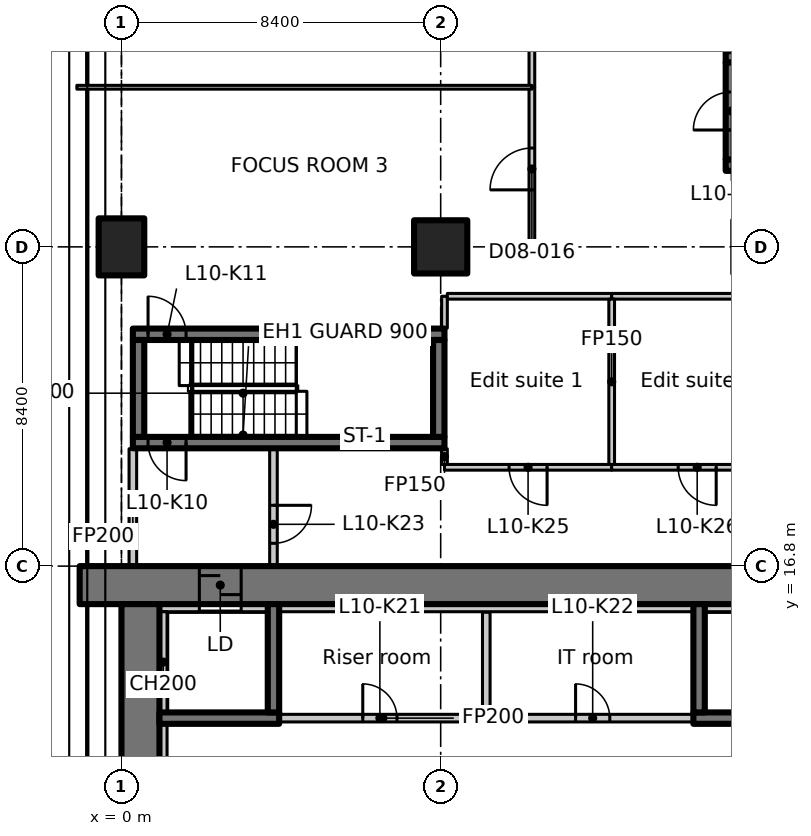
"""IFC4 building model, lengths in metres.
Left out: names, types, materials, properties, quantities, classifications, styles, units other than length and angle.
Written with IfcOpenShell. Run it as: python <this file> out.ifc"""

import sys

from ifc_helpers import new_model, si_unit, direction, frame, frame_2d, origin, origin_2d, place, context, subcontext, project, spatial, polyline, rectangle, outline, extrude, element, fill, save


model = new_model("IFC4")
c1 = context("Model", 3, precision=1e-05, world=origin(), true_north=direction((0.0, 1.0)))
c2 = subcontext(c1, "Body", "Model", "MODEL_VIEW")
j1 = project(units=[si_unit("LENGTHUNIT", "METRE"), si_unit("PLANEANGLEUNIT", "RADIAN")], contexts=[c1])
p1 = place(None, origin())
s1 = spatial("IfcSite", under=j1, at=p1, CompositionType="ELEMENT")
p2 = place(p1, origin())
s2 = spatial("IfcBuilding", under=s1, at=p2, CompositionType="ELEMENT")
p3 = place(p2, frame((0.0, 0.0, 50.9)))
s3 = spatial("IfcBuildingStorey", under=s2, at=p3, CompositionType="ELEMENT", Elevation=50.9)
p4 = place(p3, frame((0.0, 25.2, 0.0), z_axis=(0.0, 0.0, 1.0), x_axis=(1.0, 0.0, 0.0)))
e1 = element("IfcColumn", 1, at=p4, inside=s3, PredefinedType="COLUMN", context=c2, shape_type="SweptSolid", body=[
    extrude(rectangle(XDim=1.2, YDim=1.5, at=origin_2d()), origin(), (0.0, 0.0, 1.0), 3.35),
])
p5 = place(p3, frame((8.4, 25.2, 0.0), z_axis=(0.0, 0.0, 1.0), x_axis=(1.0, 0.0, 0.0)))
e2 = element("IfcColumn", 2, at=p5, inside=s3, PredefinedType="COLUMN", context=c2, shape_type="SweptSolid", body=[
    extrude(rectangle(XDim=1.4, YDim=1.4, at=origin_2d()), origin(), (0.0, 0.0, 1.0), 3.35),
])
p6 = place(p3, frame((-1.1, 16.3, 0.0), z_axis=(0.0, 0.0, 1.0), x_axis=(1.0, 0.0, 0.0)))
e3 = element("IfcWall", 3, at=p6, inside=s3, PredefinedType="SHEAR", context=c2, shape_type="SweptSolid", body=[
    extrude(rectangle(XDim=22.1, YDim=1.0, at=frame_2d((11.05, 0.0))), origin(), (0.0, 0.0, 1.0), 3.35),
])
p7 = place(p6, frame((3.15, 0.0, 0.0)))
e4 = element("IfcOpeningElement", 4, at=p7, cuts=e3, PredefinedType="OPENING", context=c2, shape_type="SweptSolid", body=[
    extrude(rectangle(XDim=1.1, YDim=2.3, at=frame_2d((0.55, 1.15))), frame((0.0, 0.51, 0.0), z_axis=(0.0, -1.0, 0.0), x_axis=(1.0, 0.0, 0.0)), (0.0, 0.0, 1.0), 1.02),
])
p8 = place(p3, frame((0.5, 6.936, 0.0), z_axis=(0.0, 0.0, 1.0), x_axis=(0.0, 1.0, 0.0)))
e5 = element("IfcWall", 5, at=p8, inside=s3, PredefinedType="SHEAR", context=c2, shape_type="SweptSolid", body=[
    extrude(rectangle(XDim=8.864, YDim=1.0, at=frame_2d((4.432, 0.0))), origin(), (0.0, 0.0, 1.0), 3.35),
])
p9 = place(p3, frame((1.0, 15.7, 0.0), z_axis=(0.0, 0.0, 1.0), x_axis=(1.0, 0.0, 0.0)))
e6 = element("IfcWall", 6, at=p9, inside=s3, PredefinedType="PARTITIONING", context=c2, shape_type="SweptSolid", body=[
    extrude(rectangle(XDim=1.05, YDim=0.2, at=frame_2d((0.525, 0.0))), origin(), (0.0, 0.0, 1.0), 3.35),
])
p10 = place(p3, frame((1.0, 12.8, 0.0), z_axis=(0.0, 0.0, 1.0), x_axis=(1.0, 0.0, 0.0)))
e7 = element("IfcWall", 7, at=p10, inside=s3, PredefinedType="SHEAR", context=c2, shape_type="SweptSolid", body=[
    extrude(rectangle(XDim=3.15, YDim=0.3, at=frame_2d((1.575, 0.0))), origin(), (0.0, 0.0, 1.0), 3.35),
])
p11 = place(p3, frame((4.0, 12.95, 0.0), z_axis=(0.0, 0.0, 1.0), x_axis=(0.0, 1.0, 0.0)))
e8 = element("IfcWall", 8, at=p11, inside=s3, PredefinedType="SHEAR", context=c2, shape_type="SweptSolid", body=[
    extrude(rectangle(XDim=2.85, YDim=0.3, at=frame_2d((1.425, 0.0))), origin(), (0.0, 0.0, 1.0), 3.35),
])
p12 = place(p3, frame((15.05, 12.8, 0.0), z_axis=(0.0, 0.0, 1.0), x_axis=(1.0, 0.0, 0.0)))
e9 = element("IfcWall", 9, at=p12, inside=s3, PredefinedType="SHEAR", context=c2, shape_type="SweptSolid", body=[
    extrude(rectangle(XDim=5.9, YDim=0.3, at=frame_2d((2.95, 0.0))), origin(), (0.0, 0.0, 1.0), 3.35),
])
p13 = place(p12, frame((3.8, 0.0, 0.0)))
e10 = element("IfcOpeningElement", 10, at=p13, cuts=e9, PredefinedType="OPENING", context=c2, shape_type="SweptSolid", body=[
    extrude(rectangle(XDim=1.1, YDim=2.3, at=frame_2d((0.55, 1.15))), frame((0.0, 0.16, 0.0), z_axis=(0.0, -1.0, 0.0), x_axis=(1.0, 0.0, 0.0)), (0.0, 0.0, 1.0), 0.32),
])
p14 = place(p3, frame((15.2, 12.95, 0.0), z_axis=(0.0, 0.0, 1.0), x_axis=(0.0, 1.0, 0.0)))
e11 = element("IfcWall", 11, at=p14, inside=s3, PredefinedType="SHEAR", context=c2, shape_type="SweptSolid", body=[
    extrude(rectangle(XDim=2.85, YDim=0.3, at=frame_2d((1.425, 0.0))), origin(), (0.0, 0.0, 1.0), 3.35),
])
p15 = place(p3, frame((8.5, 20.05, 0.0), z_axis=(0.0, 0.0, 1.0), x_axis=(-1.0, 0.0, 0.0)))
e12 = element("IfcWall", 12, at=p15, inside=s3, PredefinedType="SHEAR", context=c2, shape_type="SweptSolid", body=[
    extrude(rectangle(XDim=8.2, YDim=0.3, at=frame_2d((4.1, 0.0))), origin(), (0.0, 0.0, 1.0), 3.35),
])
p16 = place(p15, frame((6.8, 0.0, 0.0)))
e13 = element("IfcOpeningElement", 13, at=p16, cuts=e12, PredefinedType="OPENING", context=c2, shape_type="SweptSolid", body=[
    extrude(rectangle(XDim=1.0, YDim=2.1, at=frame_2d((0.5, 1.05))), frame((0.0, 0.16, 0.0), z_axis=(0.0, -1.0, 0.0), x_axis=(1.0, 0.0, 0.0)), (0.0, 0.0, 1.0), 0.32),
])
p17 = place(p3, frame((0.3, 22.9, 0.0), z_axis=(0.0, 0.0, 1.0), x_axis=(1.0, 0.0, 0.0)))
e14 = element("IfcWall", 14, at=p17, inside=s3, PredefinedType="SHEAR", context=c2, shape_type="SweptSolid", body=[
    extrude(rectangle(XDim=8.2, YDim=0.3, at=frame_2d((4.1, 0.0))), origin(), (0.0, 0.0, 1.0), 3.35),
])
p18 = place(p17, frame((0.4, 0.0, 0.0)))
e15 = element("IfcOpeningElement", 15, at=p18, cuts=e14, PredefinedType="OPENING", context=c2, shape_type="SweptSolid", body=[
    extrude(rectangle(XDim=1.0, YDim=2.1, at=frame_2d((0.5, 1.05))), frame((0.0, 0.16, 0.0), z_axis=(0.0, -1.0, 0.0), x_axis=(1.0, 0.0, 0.0)), (0.0, 0.0, 1.0), 0.32),
])
for number, where, z_axis, x_axis in (
    (16, (0.45, 20.2, 0.0), (0.0, 0.0, 1.0), (0.0, 1.0, 0.0)),
    (17, (8.35, 20.2, 0.0), (0.0, 0.0, 1.0), (0.0, 1.0, 0.0)),
):
    element("IfcWall", number, at=place(p3, frame(where, z_axis=z_axis, x_axis=x_axis)), inside=s3, PredefinedType="SHEAR", context=c2, shape_type="SweptSolid", body=[
        extrude(rectangle(XDim=2.55, YDim=0.3, at=frame_2d((1.275, 0.0))), origin(), (0.0, 0.0, 1.0), 3.35),
    ])
for number, where, z_axis, x_axis in (
    (18, (15.9, 27.35, 0.0), (0.0, 0.0, 1.0), (1.0, 0.0, 0.0)),
    (19, (15.9, 30.2, 0.0), (0.0, 0.0, 1.0), (1.0, 0.0, 0.0)),
):
    element("IfcWall", number, at=place(p3, frame(where, z_axis=z_axis, x_axis=x_axis)), inside=s3, PredefinedType="SHEAR", context=c2, shape_type="SweptSolid", body=[
        extrude(rectangle(XDim=8.2, YDim=0.3, at=frame_2d((4.1, 0.0))), origin(), (0.0, 0.0, 1.0), 3.35),
    ])
p19 = place(p3, frame((16.05, 27.5, 0.0), z_axis=(0.0, 0.0, 1.0), x_axis=(0.0, 1.0, 0.0)))
e20 = element("IfcWall", 20, at=p19, inside=s3, PredefinedType="SHEAR", context=c2, shape_type="SweptSolid", body=[
    extrude(rectangle(XDim=2.55, YDim=0.3, at=frame_2d((1.275, 0.0))), origin(), (0.0, 0.0, 1.0), 3.35),
])
p20 = place(p19, frame((0.775, 0.0, 0.0)))
e21 = element("IfcOpeningElement", 21, at=p20, cuts=e20, PredefinedType="OPENING", context=c2, shape_type="SweptSolid", body=[
    extrude(rectangle(XDim=1.0, YDim=2.1, at=frame_2d((0.5, 1.05))), frame((0.0, 0.16, 0.0), z_axis=(0.0, -1.0, 0.0), x_axis=(1.0, 0.0, 0.0)), (0.0, 0.0, 1.0), 0.32),
])
p21 = place(p3, frame((0.3, 16.812, 0.0), z_axis=(0.0, 0.0, 1.0), x_axis=(0.0, 1.0, 0.0)))
e22 = element("IfcWall", 22, at=p21, inside=s3, PredefinedType="PARTITIONING", context=c2, shape_type="SweptSolid", body=[
    extrude(rectangle(XDim=3.076, YDim=0.2, at=frame_2d((1.538, 0.0))), origin(), (0.0, 0.0, 1.0), 2.98),
])
p22 = place(p3, frame((4.0, 19.888, 0.0), z_axis=(0.0, 0.0, 1.0), x_axis=(0.0, -1.0, 0.0)))
e23 = element("IfcWall", 23, at=p22, inside=s3, PredefinedType="PARTITIONING", context=c2, shape_type="SweptSolid", body=[
    extrude(rectangle(XDim=3.076, YDim=0.2, at=frame_2d((1.538, 0.0))), origin(), (0.0, 0.0, 1.0), 3.35),
])
p23 = place(p22, frame((1.488, 0.0, 0.0)))
e24 = element("IfcOpeningElement", 24, at=p23, cuts=e23, PredefinedType="OPENING", context=c2, shape_type="SweptSolid", body=[
    extrude(rectangle(XDim=1.0, YDim=2.1, at=frame_2d((0.5, 1.05))), frame((0.0, 0.11, 0.0), z_axis=(0.0, -1.0, 0.0), x_axis=(1.0, 0.0, 0.0)), (0.0, 0.0, 1.0), 0.22),
])
p24 = place(p3, frame((4.162, 12.8, 0.0), z_axis=(0.0, 0.0, 1.0), x_axis=(1.0, 0.0, 0.0)))
e25 = element("IfcWall", 25, at=p24, inside=s3, PredefinedType="PARTITIONING", context=c2, shape_type="SweptSolid", body=[
    extrude(rectangle(XDim=5.438, YDim=0.2, at=frame_2d((2.719, 0.0))), origin(), (0.0, 0.0, 1.0), 3.35),
])
p25 = place(p24, frame((2.188, 0.0, 0.0)))
e26 = element("IfcOpeningElement", 26, at=p25, cuts=e25, PredefinedType="OPENING", context=c2, shape_type="SweptSolid", body=[
    extrude(rectangle(XDim=0.9, YDim=2.1, at=frame_2d((0.45, 1.05))), frame((0.0, 0.11, 0.0), z_axis=(0.0, -1.0, 0.0), x_axis=(1.0, 0.0, 0.0)), (0.0, 0.0, 1.0), 0.22),
])
p26 = place(p3, frame((9.6, 12.8, 0.0), z_axis=(0.0, 0.0, 1.0), x_axis=(1.0, 0.0, 0.0)))
e27 = element("IfcWall", 27, at=p26, inside=s3, PredefinedType="PARTITIONING", context=c2, shape_type="SweptSolid", body=[
    extrude(rectangle(XDim=5.438, YDim=0.2, at=frame_2d((2.719, 0.0))), origin(), (0.0, 0.0, 1.0), 3.35),
])
p27 = place(p26, frame((2.35, 0.0, 0.0)))
e28 = element("IfcOpeningElement", 28, at=p27, cuts=e27, PredefinedType="OPENING", context=c2, shape_type="SweptSolid", body=[
    extrude(rectangle(XDim=0.9, YDim=2.1, at=frame_2d((0.45, 1.05))), frame((0.0, 0.11, 0.0), z_axis=(0.0, -1.0, 0.0), x_axis=(1.0, 0.0, 0.0)), (0.0, 0.0, 1.0), 0.22),
])
p28 = place(p3, frame((9.6, 15.588, 0.0), z_axis=(0.0, 0.0, 1.0), x_axis=(0.0, -1.0, 0.0)))
e29 = element("IfcWall", 29, at=p28, inside=s3, PredefinedType="PARTITIONING", context=c2, shape_type="SweptSolid", body=[
    extrude(rectangle(XDim=2.688, YDim=0.2, at=frame_2d((1.344, 0.0))), origin(), (0.0, 0.0, 1.0), 3.35),
])
p29 = place(p3, frame((12.9, 19.4, 0.0), z_axis=(0.0, 0.0, 1.0), x_axis=(-1.0, 0.0, 0.0)))
e30 = element("IfcWall", 30, at=p29, inside=s3, PredefinedType="PARTITIONING", context=c2, shape_type="SweptSolid", body=[
    extrude(rectangle(XDim=4.4, YDim=0.15, at=frame_2d((2.2, 0.0))), origin(), (0.0, 0.0, 1.0), 3.35),
])
p30 = place(p29, frame((1.7, 0.0, 0.0)))
e31 = element("IfcOpeningElement", 31, at=p30, cuts=e30, PredefinedType="OPENING", context=c2, shape_type="SweptSolid", body=[
    extrude(rectangle(XDim=1.0, YDim=2.1, at=frame_2d((0.5, 1.05))), frame((0.0, 0.085, 0.0), z_axis=(0.0, -1.0, 0.0), x_axis=(1.0, 0.0, 0.0)), (0.0, 0.0, 1.0), 0.17),
])
p31 = place(p3, frame((8.5, 19.475, 0.0), z_axis=(0.0, 0.0, 1.0), x_axis=(0.0, 1.0, 0.0)))
e32 = element("IfcWall", 32, at=p31, inside=s3, PredefinedType="PARTITIONING", context=c2, shape_type="SweptSolid", body=[
    extrude(rectangle(XDim=0.413, YDim=0.15, at=frame_2d((0.207, 0.0))), origin(), (0.0, 0.0, 1.0), 3.35),
])
p32 = place(p3, frame((8.5, 23.062, 0.0), z_axis=(0.0, 0.0, 1.0), x_axis=(0.0, 1.0, 0.0)))
e33 = element("IfcWall", 33, at=p32, inside=s3, PredefinedType="PARTITIONING", context=c2, shape_type="SweptSolid", body=[
    extrude(rectangle(XDim=0.838, YDim=0.15, at=frame_2d((0.419, 0.0))), origin(), (0.0, 0.0, 1.0), 3.35),
])
p33 = place(p3, frame((8.575, 23.9, 0.0), z_axis=(0.0, 0.0, 1.0), x_axis=(1.0, 0.0, 0.0)))
e34 = element("IfcWall", 34, at=p33, inside=s3, PredefinedType="PARTITIONING", context=c2, shape_type="SweptSolid", body=[
    extrude(rectangle(XDim=4.325, YDim=0.15, at=frame_2d((2.163, 0.0))), origin(), (0.0, 0.0, 1.0), 3.35),
])
p34 = place(p3, frame((12.9, 23.9, 0.0), z_axis=(0.0, 0.0, 1.0), x_axis=(1.0, 0.0, 0.0)))
e35 = element("IfcWall", 35, at=p34, inside=s3, PredefinedType="PARTITIONING", context=c2, shape_type="SweptSolid", body=[
    extrude(rectangle(XDim=4.5, YDim=0.15, at=frame_2d((2.25, 0.0))), origin(), (0.0, 0.0, 1.0), 3.35),
])
p35 = place(p3, frame((17.325, 19.4, 0.0), z_axis=(0.0, 0.0, 1.0), x_axis=(-1.0, 0.0, 0.0)))
e36 = element("IfcWall", 36, at=p35, inside=s3, PredefinedType="PARTITIONING", context=c2, shape_type="SweptSolid", body=[
    extrude(rectangle(XDim=4.425, YDim=0.15, at=frame_2d((2.212, 0.0))), origin(), (0.0, 0.0, 1.0), 3.35),
])
p36 = place(p35, frame((1.675, 0.0, 0.0)))
e37 = element("IfcOpeningElement", 37, at=p36, cuts=e36, PredefinedType="OPENING", context=c2, shape_type="SweptSolid", body=[
    extrude(rectangle(XDim=1.0, YDim=2.1, at=frame_2d((0.5, 1.05))), frame((0.0, 0.085, 0.0), z_axis=(0.0, -1.0, 0.0), x_axis=(1.0, 0.0, 0.0)), (0.0, 0.0, 1.0), 0.17),
])
p37 = place(p3, frame((12.9, 23.825, 0.0), z_axis=(0.0, 0.0, 1.0), x_axis=(0.0, -1.0, 0.0)))
e38 = element("IfcWall", 38, at=p37, inside=s3, PredefinedType="PARTITIONING", context=c2, shape_type="SweptSolid", body=[
    extrude(rectangle(XDim=4.35, YDim=0.15, at=frame_2d((2.175, 0.0))), origin(), (0.0, 0.0, 1.0), 3.35),
])
p38 = place(p3, frame((1.1, 9.75, 0.0), z_axis=(0.0, 0.0, 1.0), x_axis=(0.0, 1.0, 0.0)))
e39 = element("IfcWall", 39, at=p38, inside=s3, PredefinedType="PARTITIONING", context=c2, shape_type="SweptSolid", body=[
    extrude(rectangle(XDim=2.9, YDim=0.2, at=frame_2d((1.45, 0.0))), origin(), (0.0, 0.0, 1.0), 3.35),
])
p39 = place(p3, frame((1.1, 12.95, 0.0), z_axis=(0.0, 0.0, 1.0), x_axis=(0.0, 1.0, 0.0)))
e40 = element("IfcWall", 40, at=p39, inside=s3, PredefinedType="PARTITIONING", context=c2, shape_type="SweptSolid", body=[
    extrude(rectangle(XDim=2.65, YDim=0.2, at=frame_2d((1.325, 0.0))), origin(), (0.0, 0.0, 1.0), 3.35),
])
p40 = place(p3, frame((3.15, 15.7, 0.0), z_axis=(0.0, 0.0, 1.0), x_axis=(1.0, 0.0, 0.0)))
e41 = element("IfcWall", 41, at=p40, inside=s3, PredefinedType="PARTITIONING", context=c2, shape_type="SweptSolid", body=[
    extrude(rectangle(XDim=0.7, YDim=0.2, at=frame_2d((0.35, 0.0))), origin(), (0.0, 0.0, 1.0), 3.35),
])
p41 = place(p3, frame((4.15, 15.7, 0.0), z_axis=(0.0, 0.0, 1.0), x_axis=(1.0, 0.0, 0.0)))
e42 = element("IfcWall", 42, at=p41, inside=s3, PredefinedType="PARTITIONING", context=c2, shape_type="SweptSolid", body=[
    extrude(rectangle(XDim=10.9, YDim=0.2, at=frame_2d((5.45, 0.0))), origin(), (0.0, 0.0, 1.0), 3.35),
])
p42 = place(p3, frame((15.35, 15.7, 0.0), z_axis=(0.0, 0.0, 1.0), x_axis=(1.0, 0.0, 0.0)))
e43 = element("IfcWall", 43, at=p42, inside=s3, PredefinedType="PARTITIONING", context=c2, shape_type="SweptSolid", body=[
    extrude(rectangle(XDim=2.5, YDim=0.2, at=frame_2d((1.25, 0.0))), origin(), (0.0, 0.0, 1.0), 3.35),
])
p43 = place(p3, frame((10.8, 25.2, 0.0), z_axis=(0.0, 0.0, 1.0), x_axis=(0.0, 1.0, 0.0)))
e44 = element("IfcWall", 44, at=p43, inside=s3, PredefinedType="PARTITIONING", context=c2, shape_type="SweptSolid", body=[
    extrude(rectangle(XDim=4.2, YDim=0.15, at=frame_2d((2.1, 0.0))), origin(), (0.0, 0.0, 1.0), 3.33),
])
p44 = place(p43, frame((1.5, 0.0, 0.0)))
e45 = element("IfcOpeningElement", 45, at=p44, cuts=e44, PredefinedType="OPENING", context=c2, shape_type="SweptSolid", body=[
    extrude(rectangle(XDim=1.1, YDim=2.1, at=frame_2d((0.55, 1.05))), frame((0.0, 0.085, 0.0), z_axis=(0.0, -1.0, 0.0), x_axis=(1.0, 0.0, 0.0)), (0.0, 0.0, 1.0), 0.17),
])
p45 = place(p3, frame((10.8, 29.4, 0.0), z_axis=(0.0, 0.0, 1.0), x_axis=(0.0, 1.0, 0.0)))
e46 = element("IfcWall", 46, at=p45, inside=s3, PredefinedType="PARTITIONING", context=c2, shape_type="SweptSolid", body=[
    extrude(rectangle(XDim=4.2, YDim=0.15, at=frame_2d((2.1, 0.0))), origin(), (0.0, 0.0, 1.0), 3.33),
])
p46 = place(p45, frame((1.5, 0.0, 0.0)))
e47 = element("IfcOpeningElement", 47, at=p46, cuts=e46, PredefinedType="OPENING", context=c2, shape_type="SweptSolid", body=[
    extrude(rectangle(XDim=1.1, YDim=2.1, at=frame_2d((0.55, 1.05))), frame((0.0, 0.085, 0.0), z_axis=(0.0, -1.0, 0.0), x_axis=(1.0, 0.0, 0.0)), (0.0, 0.0, 1.0), 0.17),
])
p47 = place(p3, frame((-1.174, 29.4, 0.0), z_axis=(0.0, 0.0, 1.0), x_axis=(1.0, 0.0, 0.0)))
e48 = element("IfcWall", 48, at=p47, inside=s3, PredefinedType="PARTITIONING", context=c2, shape_type="SweptSolid", body=[
    extrude(outline(polyline([(0.0, 0.0), (11.974, 0.0), (11.974, 3.33), (1.624, 3.33), (1.622, 2.98), (0.726, 2.98), (0.724, 3.33), (0.074, 3.33), (0.0, 3.33), (0.0, 0.0)])), frame((0.0, 0.05, 0.0), z_axis=(0.0, -1.0, 0.0), x_axis=(1.0, 0.0, 0.0)), (0.0, 0.0, 1.0), 0.1),
])
p48 = place(p7, origin())
e49 = element("IfcDoor", 49, at=p48, inside=s3, OperationType="SLIDING_TO_LEFT", PredefinedType="DOOR", context=c2, shape_type="SweptSolid", body=[
    extrude(rectangle(XDim=1.1, YDim=2.3, at=frame_2d((0.55, 1.15))), frame((0.0, 0.025, 0.0), z_axis=(0.0, -1.0, 0.0), x_axis=(1.0, 0.0, 0.0)), (0.0, 0.0, 1.0), 0.05),
])
fill(e4, e49)
p49 = place(p16, origin())
e50 = element("IfcDoor", 50, at=p49, inside=s3, OperationType="SINGLE_SWING_RIGHT", PredefinedType="DOOR", context=c2, shape_type="SweptSolid", body=[
    extrude(rectangle(XDim=1.0, YDim=2.1, at=frame_2d((0.5, 1.05))), frame((0.0, 0.025, 0.0), z_axis=(0.0, -1.0, 0.0), x_axis=(1.0, 0.0, 0.0)), (0.0, 0.0, 1.0), 0.05),
])
fill(e13, e50)
p50 = place(p18, origin())
e51 = element("IfcDoor", 51, at=p50, inside=s3, OperationType="SINGLE_SWING_LEFT", PredefinedType="DOOR", context=c2, shape_type="SweptSolid", body=[
    extrude(rectangle(XDim=1.0, YDim=2.1, at=frame_2d((0.5, 1.05))), frame((0.0, 0.025, 0.0), z_axis=(0.0, -1.0, 0.0), x_axis=(1.0, 0.0, 0.0)), (0.0, 0.0, 1.0), 0.05),
])
fill(e15, e51)
p51 = place(p20, origin())
e52 = element("IfcDoor", 52, at=p51, inside=s3, OperationType="SINGLE_SWING_RIGHT", PredefinedType="DOOR", context=c2, shape_type="SweptSolid", body=[
    extrude(rectangle(XDim=1.0, YDim=2.1, at=frame_2d((0.5, 1.05))), frame((0.0, 0.025, 0.0), z_axis=(0.0, -1.0, 0.0), x_axis=(1.0, 0.0, 0.0)), (0.0, 0.0, 1.0), 0.05),
])
fill(e21, e52)
p52 = place(p25, origin())
e53 = element("IfcDoor", 53, at=p52, inside=s3, OperationType="SINGLE_SWING_LEFT", PredefinedType="DOOR", context=c2, shape_type="SweptSolid", body=[
    extrude(rectangle(XDim=0.9, YDim=2.1, at=frame_2d((0.45, 1.05))), frame((0.0, 0.025, 0.0), z_axis=(0.0, -1.0, 0.0), x_axis=(1.0, 0.0, 0.0)), (0.0, 0.0, 1.0), 0.05),
])
fill(e26, e53)
p53 = place(p27, origin())
e54 = element("IfcDoor", 54, at=p53, inside=s3, OperationType="SINGLE_SWING_RIGHT", PredefinedType="DOOR", context=c2, shape_type="SweptSolid", body=[
    extrude(rectangle(XDim=0.9, YDim=2.1, at=frame_2d((0.45, 1.05))), frame((0.0, 0.025, 0.0), z_axis=(0.0, -1.0, 0.0), x_axis=(1.0, 0.0, 0.0)), (0.0, 0.0, 1.0), 0.05),
])
fill(e28, e54)
p54 = place(p23, origin())
e55 = element("IfcDoor", 55, at=p54, inside=s3, OperationType="SINGLE_SWING_LEFT", PredefinedType="DOOR", context=c2, shape_type="SweptSolid", body=[
    extrude(rectangle(XDim=1.0, YDim=2.1, at=frame_2d((0.5, 1.05))), frame((0.0, 0.025, 0.0), z_axis=(0.0, -1.0, 0.0), x_axis=(1.0, 0.0, 0.0)), (0.0, 0.0, 1.0), 0.05),
])
fill(e24, e55)
p55 = place(p30, origin())
e56 = element("IfcDoor", 56, at=p55, inside=s3, OperationType="SINGLE_SWING_LEFT", PredefinedType="DOOR", context=c2, shape_type="SweptSolid", body=[
    extrude(rectangle(XDim=1.0, YDim=2.1, at=frame_2d((0.5, 1.05))), frame((0.0, 0.025, 0.0), z_axis=(0.0, -1.0, 0.0), x_axis=(1.0, 0.0, 0.0)), (0.0, 0.0, 1.0), 0.05),
])
fill(e31, e56)
p56 = place(p36, origin())
e57 = element("IfcDoor", 57, at=p56, inside=s3, OperationType="SINGLE_SWING_RIGHT", PredefinedType="DOOR", context=c2, shape_type="SweptSolid", body=[
    extrude(rectangle(XDim=1.0, YDim=2.1, at=frame_2d((0.5, 1.05))), frame((0.0, 0.025, 0.0), z_axis=(0.0, -1.0, 0.0), x_axis=(1.0, 0.0, 0.0)), (0.0, 0.0, 1.0), 0.05),
])
fill(e37, e57)
p57 = place(p44, origin())
e58 = element("IfcDoor", 58, at=p57, inside=s3, OperationType="SINGLE_SWING_LEFT", PredefinedType="DOOR", context=c2, shape_type="SweptSolid", body=[
    extrude(rectangle(XDim=1.1, YDim=2.1, at=frame_2d((0.55, 1.05))), frame((0.0, 0.025, 0.0), z_axis=(0.0, -1.0, 0.0), x_axis=(1.0, 0.0, 0.0)), (0.0, 0.0, 1.0), 0.05),
])
fill(e45, e58)
save(model, sys.argv[1])
